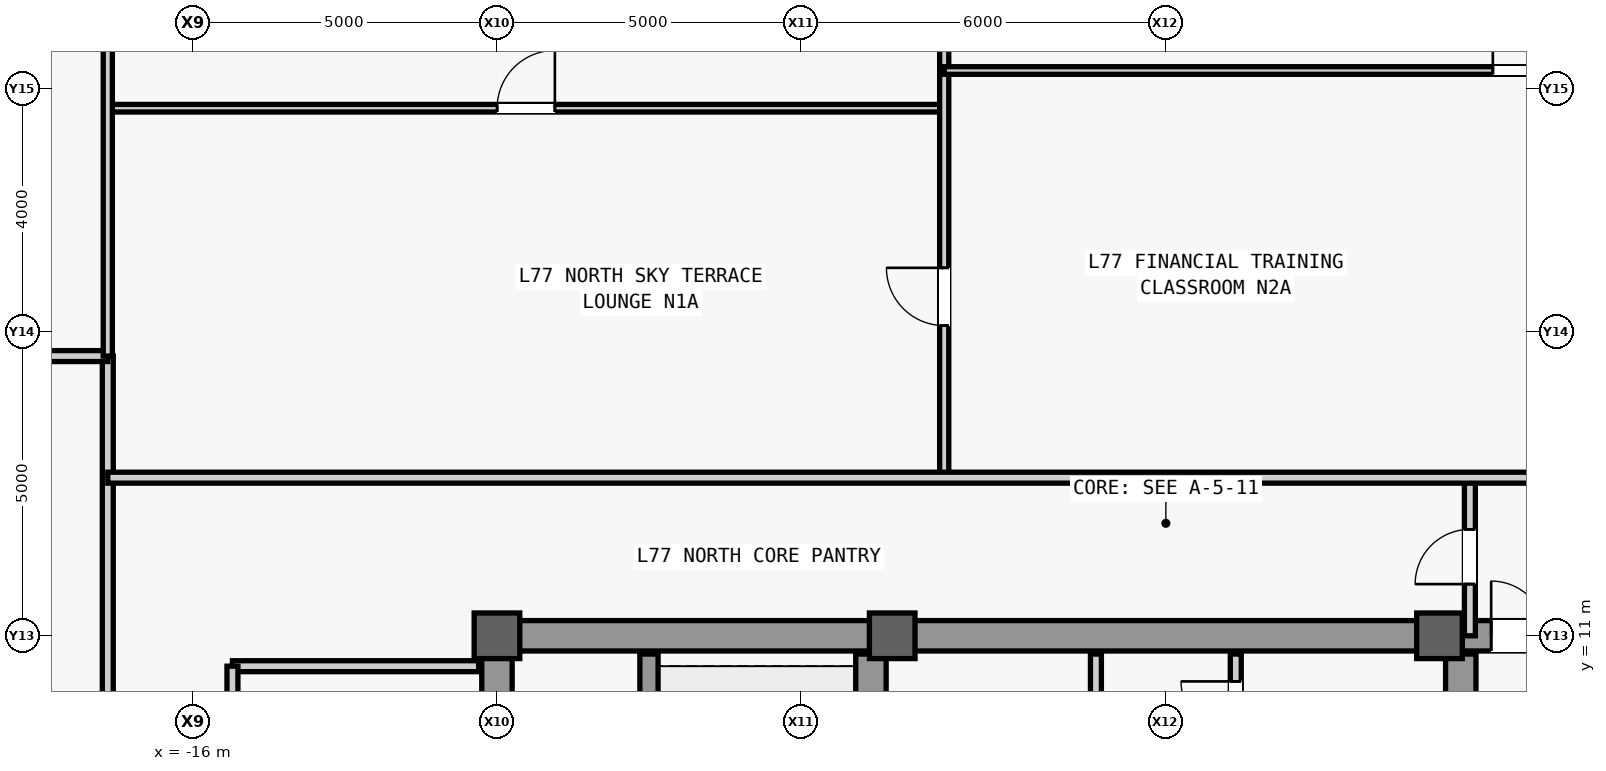
"""IFC4 building model, lengths in metres.
Left out: names, types, materials, properties, quantities, classifications, styles, units other than length and angle.
Written with IfcOpenShell. Run it as: python <this file> out.ifc"""

import sys

from ifc_helpers import new_model, si_unit, direction, frame, frame_2d, origin, origin_2d, place, context, subcontext, project, spatial, rectangle, extrude, source, transform, mapped, element, fill, save


model = new_model("IFC4")
c1 = context("Model", 3, precision=1e-05, world=origin(), true_north=direction((0.0, 1.0)))
c2 = subcontext(c1, "Body", "Model", "MODEL_VIEW")
j1 = project(units=[si_unit("LENGTHUNIT", "METRE"), si_unit("PLANEANGLEUNIT", "RADIAN")], contexts=[c1])
p1 = place(None, origin())
s1 = spatial("IfcSite", under=j1, at=p1, CompositionType="ELEMENT")
p2 = place(p1, origin())
s2 = spatial("IfcBuilding", under=s1, at=p2, CompositionType="ELEMENT")
p3 = place(p2, frame((0.0, 0.0, 326.3)))
s3 = spatial("IfcBuildingStorey", under=s2, at=p3, CompositionType="ELEMENT", Elevation=326.3)
m1 = source(origin(), c2, "Body", "SweptSolid", [
    extrude(rectangle(XDim=22.0, YDim=0.5, at=frame_2d((11.0, 0.0))), origin(), (0.0, 0.0, 1.0), 3.74),
])
p4 = place(p3, frame((-11.0, -11.0, 0.0), z_axis=(0.0, 0.0, 1.0), x_axis=(0.0, 1.0, 0.0)))
e1 = element("IfcWall", 1, at=p4, inside=s3, PredefinedType="SHEAR", context=c2, shape_type="MappedRepresentation", body=[
    mapped(m1, transform((0.0, 0.0, 0.0), scale=1.0)),
])
m2 = source(origin(), c2, "Body", "SweptSolid", [
    extrude(rectangle(XDim=1.1, YDim=2.2, at=frame_2d((0.55, 1.1))), frame((0.0, 0.26, 0.0), z_axis=(0.0, -1.0, 0.0), x_axis=(1.0, 0.0, 0.0)), (0.0, 0.0, 1.0), 0.52),
])
p5 = place(p4, frame((0.8, 0.0, 0.0)))
e2 = element("IfcOpeningElement", 2, at=p5, cuts=e1, PredefinedType="OPENING", context=c2, shape_type="MappedRepresentation", body=[
    mapped(m2, transform((0.0, 0.0, 0.0), scale=1.0)),
])
p6 = place(p4, frame((12.5, 0.0, 0.0)))
e3 = element("IfcOpeningElement", 3, at=p6, cuts=e1, PredefinedType="OPENING", context=c2, shape_type="MappedRepresentation", body=[
    mapped(m2, transform((0.0, 0.0, 0.0), scale=1.0)),
])
m3 = source(origin(), c2, "Body", "SweptSolid", [
    extrude(rectangle(XDim=0.9, YDim=2.15, at=frame_2d((0.45, 1.075))), frame((0.0, 0.26, 0.0), z_axis=(0.0, -1.0, 0.0), x_axis=(1.0, 0.0, 0.0)), (0.0, 0.0, 1.0), 0.52),
])
p7 = place(p4, frame((7.575, 0.0, 0.0)))
e4 = element("IfcOpeningElement", 4, at=p7, cuts=e1, PredefinedType="OPENING", context=c2, shape_type="MappedRepresentation", body=[
    mapped(m3, transform((0.0, 0.0, 0.0), scale=1.0)),
])
m4 = source(origin(), c2, "Body", "SweptSolid", [
    extrude(rectangle(XDim=1.2, YDim=2.3, at=frame_2d((0.6, 1.15))), frame((0.0, 0.26, 0.0), z_axis=(0.0, -1.0, 0.0), x_axis=(1.0, 0.0, 0.0)), (0.0, 0.0, 1.0), 0.52),
])
p8 = place(p4, frame((14.6, 0.0, 0.0)))
e5 = element("IfcOpeningElement", 5, at=p8, cuts=e1, PredefinedType="OPENING", context=c2, shape_type="MappedRepresentation", body=[
    mapped(m4, transform((0.0, 0.0, 0.0), scale=1.0)),
])
p9 = place(p4, frame((18.2, 0.0, 0.0)))
e6 = element("IfcOpeningElement", 6, at=p9, cuts=e1, PredefinedType="OPENING", context=c2, shape_type="MappedRepresentation", body=[
    mapped(m4, transform((0.0, 0.0, 0.0), scale=1.0)),
])
m5 = source(origin(), c2, "Body", "SweptSolid", [
    extrude(rectangle(XDim=1.3, YDim=2.3, at=frame_2d((0.65, 1.15))), frame((0.0, 0.26, 0.0), z_axis=(0.0, -1.0, 0.0), x_axis=(1.0, 0.0, 0.0)), (0.0, 0.0, 1.0), 0.52),
])
p10 = place(p4, frame((2.7, 0.0, 0.0)))
e7 = element("IfcOpeningElement", 7, at=p10, cuts=e1, PredefinedType="OPENING", context=c2, shape_type="MappedRepresentation", body=[
    mapped(m5, transform((0.0, 0.0, 0.0), scale=1.0)),
])
m6 = source(origin(), c2, "Body", "SweptSolid", [
    extrude(rectangle(XDim=21.4, YDim=0.5, at=frame_2d((10.7, 0.0))), origin(), (0.0, 0.0, 1.0), 3.74),
])
for number, where, z_axis, x_axis in (
    (8, (-4.85, -10.7, 0.0), (0.0, 0.0, 1.0), (0.0, 1.0, 0.0)),
    (9, (4.85, -10.7, 0.0), (0.0, 0.0, 1.0), (0.0, 1.0, 0.0)),
):
    element("IfcWall", number, at=place(p3, frame(where, z_axis=z_axis, x_axis=x_axis)), inside=s3, PredefinedType="SHEAR", context=c2, shape_type="MappedRepresentation", body=[
        mapped(m6, transform((0.0, 0.0, 0.0), scale=1.0)),
    ])
m7 = source(origin(), c2, "Body", "SweptSolid", [
    extrude(rectangle(XDim=5.9, YDim=0.5, at=frame_2d((2.95, 0.0))), origin(), (0.0, 0.0, 1.0), 3.74),
])
p11 = place(p3, frame((-10.75, 11.0, 0.0), z_axis=(0.0, 0.0, 1.0), x_axis=(1.0, 0.0, 0.0)))
e10 = element("IfcWall", 10, at=p11, inside=s3, PredefinedType="SHEAR", context=c2, shape_type="MappedRepresentation", body=[
    mapped(m7, transform((0.0, 0.0, 0.0), scale=1.0)),
])
p12 = place(p3, frame((4.85, 11.0, 0.0), z_axis=(0.0, 0.0, 1.0), x_axis=(1.0, 0.0, 0.0)))
e11 = element("IfcWall", 11, at=p12, inside=s3, PredefinedType="SHEAR", context=c2, shape_type="MappedRepresentation", body=[
    mapped(m7, transform((0.0, 0.0, 0.0), scale=1.0)),
])
p13 = place(p12, frame((0.5, 0.0, 0.0)))
e12 = element("IfcOpeningElement", 12, at=p13, cuts=e11, PredefinedType="OPENING", context=c2, shape_type="MappedRepresentation", body=[
    mapped(m3, transform((0.0, 0.0, 0.0), scale=1.0)),
])
m8 = source(origin(), c2, "Body", "SweptSolid", [
    extrude(rectangle(XDim=9.2, YDim=0.5, at=frame_2d((4.6, 0.0))), origin(), (0.0, 0.0, 1.0), 3.74),
])
p14 = place(p3, frame((-4.6, 11.0, 0.0), z_axis=(0.0, 0.0, 1.0), x_axis=(1.0, 0.0, 0.0)))
e13 = element("IfcWall", 13, at=p14, inside=s3, PredefinedType="SHEAR", context=c2, shape_type="MappedRepresentation", body=[
    mapped(m8, transform((0.0, 0.0, 0.0), scale=1.0)),
])
m9 = source(origin(), c2, "Body", "SweptSolid", [
    extrude(rectangle(XDim=0.75, YDim=0.75, at=origin_2d()), origin(), (0.0, 0.0, 1.0), 4.0),
])
for number, where, z_axis, x_axis in (
    (14, (-11.0, 11.0, 0.0), (0.0, 0.0, 1.0), (1.0, 0.0, 0.0)),
    (15, (-4.5, 11.0, 0.0), (0.0, 0.0, 1.0), (1.0, 0.0, 0.0)),
    (16, (4.5, 11.0, 0.0), (0.0, 0.0, 1.0), (1.0, 0.0, 0.0)),
):
    element("IfcColumn", number, at=place(p3, frame(where, z_axis=z_axis, x_axis=x_axis)), inside=s3, PredefinedType="COLUMN", context=c2, shape_type="MappedRepresentation", body=[
        mapped(m9, transform((0.0, 0.0, 0.0), scale=1.0)),
    ])
m10 = source(origin(), c2, "Body", "SweptSolid", [
    extrude(rectangle(XDim=7.75, YDim=0.3, at=frame_2d((3.875, 0.0))), origin(), (0.0, 0.0, 1.0), 3.74),
])
p15 = place(p3, frame((-8.5, 2.95, 0.0), z_axis=(0.0, 0.0, 1.0), x_axis=(0.0, 1.0, 0.0)))
e17 = element("IfcWall", 17, at=p15, inside=s3, PredefinedType="SHEAR", context=c2, shape_type="MappedRepresentation", body=[
    mapped(m10, transform((0.0, 0.0, 0.0), scale=1.0)),
])
m11 = source(origin(), c2, "Body", "SweptSolid", [
    extrude(rectangle(XDim=4.05, YDim=0.18, at=frame_2d((2.025, 0.0))), origin(), (0.0, 0.0, 1.0), 3.74),
])
p16 = place(p3, frame((-15.35, 10.5, 0.0), z_axis=(0.0, 0.0, 1.0), x_axis=(1.0, 0.0, 0.0)))
e18 = element("IfcWall", 18, at=p16, inside=s3, PredefinedType="PARTITIONING", context=c2, shape_type="MappedRepresentation", body=[
    mapped(m11, transform((0.0, 0.0, 0.0), scale=1.0)),
])
m12 = source(origin(), c2, "Body", "SweptSolid", [
    extrude(rectangle(XDim=16.6, YDim=0.18, at=frame_2d((8.3, 0.0))), origin(), (0.0, 0.0, 1.0), 3.74),
])
p17 = place(p3, frame((-15.35, -6.1, 0.0), z_axis=(0.0, 0.0, 1.0), x_axis=(0.0, 1.0, 0.0)))
e19 = element("IfcWall", 19, at=p17, inside=s3, PredefinedType="PARTITIONING", context=c2, shape_type="MappedRepresentation", body=[
    mapped(m12, transform((0.0, 0.0, 0.0), scale=1.0)),
])
m13 = source(origin(), c2, "Body", "SweptSolid", [
    extrude(rectangle(XDim=1.8, YDim=2.25, at=frame_2d((0.9, 1.125))), frame((0.0, 0.1, 0.0), z_axis=(0.0, -1.0, 0.0), x_axis=(1.0, 0.0, 0.0)), (0.0, 0.0, 1.0), 0.2),
])
p18 = place(p17, frame((2.7, 0.0, 0.0)))
e20 = element("IfcOpeningElement", 20, at=p18, cuts=e19, PredefinedType="OPENING", context=c2, shape_type="MappedRepresentation", body=[
    mapped(m13, transform((0.0, 0.0, 0.0), scale=1.0)),
])
p19 = place(p17, frame((11.0, 0.0, 0.0)))
e21 = element("IfcOpeningElement", 21, at=p19, cuts=e19, PredefinedType="OPENING", context=c2, shape_type="MappedRepresentation", body=[
    mapped(m13, transform((0.0, 0.0, 0.0), scale=1.0)),
])
m14 = source(origin(), c2, "Body", "SweptSolid", [
    extrude(rectangle(XDim=5.4, YDim=0.18, at=frame_2d((2.7, 0.0))), origin(), (0.0, 0.0, 1.0), 3.74),
])
p20 = place(p3, frame((-1.15, 5.3, 0.0), z_axis=(0.0, 0.0, 1.0), x_axis=(0.0, 1.0, 0.0)))
e22 = element("IfcWall", 22, at=p20, inside=s3, PredefinedType="PARTITIONING", context=c2, shape_type="MappedRepresentation", body=[
    mapped(m14, transform((0.0, 0.0, 0.0), scale=1.0)),
])
m15 = source(origin(), c2, "Body", "SweptSolid", [
    extrude(rectangle(XDim=0.9, YDim=2.15, at=frame_2d((0.45, 1.075))), frame((0.0, 0.1, 0.0), z_axis=(0.0, -1.0, 0.0), x_axis=(1.0, 0.0, 0.0)), (0.0, 0.0, 1.0), 0.2),
])
p21 = place(p20, frame((0.7, 0.0, 0.0)))
e23 = element("IfcOpeningElement", 23, at=p21, cuts=e22, PredefinedType="OPENING", context=c2, shape_type="MappedRepresentation", body=[
    mapped(m15, transform((0.0, 0.0, 0.0), scale=1.0)),
])
p22 = place(p20, frame((3.4, 0.0, 0.0)))
e24 = element("IfcOpeningElement", 24, at=p22, cuts=e22, PredefinedType="OPENING", context=c2, shape_type="MappedRepresentation", body=[
    mapped(m15, transform((0.0, 0.0, 0.0), scale=1.0)),
])
p23 = place(p3, frame((1.15, 5.3, 0.0), z_axis=(0.0, 0.0, 1.0), x_axis=(0.0, 1.0, 0.0)))
e25 = element("IfcWall", 25, at=p23, inside=s3, PredefinedType="PARTITIONING", context=c2, shape_type="MappedRepresentation", body=[
    mapped(m14, transform((0.0, 0.0, 0.0), scale=1.0)),
])
p24 = place(p23, frame((0.45, 0.0, 0.0)))
e26 = element("IfcOpeningElement", 26, at=p24, cuts=e25, PredefinedType="OPENING", context=c2, shape_type="MappedRepresentation", body=[
    mapped(m15, transform((0.0, 0.0, 0.0), scale=1.0)),
])
p25 = place(p23, frame((2.25, 0.0, 0.0)))
e27 = element("IfcOpeningElement", 27, at=p25, cuts=e25, PredefinedType="OPENING", context=c2, shape_type="MappedRepresentation", body=[
    mapped(m15, transform((0.0, 0.0, 0.0), scale=1.0)),
])
p26 = place(p23, frame((4.05, 0.0, 0.0)))
e28 = element("IfcOpeningElement", 28, at=p26, cuts=e25, PredefinedType="OPENING", context=c2, shape_type="MappedRepresentation", body=[
    mapped(m15, transform((0.0, 0.0, 0.0), scale=1.0)),
])
m16 = source(origin(), c2, "Body", "SweptSolid", [
    extrude(rectangle(XDim=8.4, YDim=0.18, at=frame_2d((4.2, 0.0))), origin(), (0.0, 0.0, 1.0), 3.74),
])
p27 = place(p3, frame((-17.4, 7.2, 0.0), z_axis=(0.0, 0.0, 1.0), x_axis=(0.0, 1.0, 0.0)))
e29 = element("IfcWall", 29, at=p27, inside=s3, PredefinedType="PARTITIONING", context=c2, shape_type="MappedRepresentation", body=[
    mapped(m16, transform((0.0, 0.0, 0.0), scale=1.0)),
])
m17 = source(origin(), c2, "Body", "SweptSolid", [
    extrude(rectangle(XDim=2.6, YDim=0.18, at=frame_2d((1.3, 0.0))), origin(), (0.0, 0.0, 1.0), 3.74),
])
p28 = place(p3, frame((5.0, 11.0, 0.0), z_axis=(0.0, 0.0, 1.0), x_axis=(0.0, 1.0, 0.0)))
e30 = element("IfcWall", 30, at=p28, inside=s3, PredefinedType="PARTITIONING", context=c2, shape_type="MappedRepresentation", body=[
    mapped(m17, transform((0.0, 0.0, 0.0), scale=1.0)),
])
p29 = place(p28, frame((0.85, 0.0, 0.0)))
e31 = element("IfcOpeningElement", 31, at=p29, cuts=e30, PredefinedType="OPENING", context=c2, shape_type="MappedRepresentation", body=[
    mapped(m15, transform((0.0, 0.0, 0.0), scale=1.0)),
])
m18 = source(origin(), c2, "Body", "SweptSolid", [
    extrude(rectangle(XDim=1.15, YDim=0.18, at=frame_2d((0.575, 0.0))), origin(), (0.0, 0.0, 1.0), 3.74),
])
p30 = place(p3, frame((-18.55, 15.6, 0.0), z_axis=(0.0, 0.0, 1.0), x_axis=(1.0, 0.0, 0.0)))
e32 = element("IfcWall", 32, at=p30, inside=s3, PredefinedType="PARTITIONING", context=c2, shape_type="MappedRepresentation", body=[
    mapped(m18, transform((0.0, 0.0, 0.0), scale=1.0)),
])
m19 = source(origin(), c2, "Body", "SweptSolid", [
    extrude(rectangle(XDim=13.755, YDim=0.125, at=frame_2d((6.877, 0.0))), origin(), (0.0, 0.0, 1.0), 3.393),
])
p31 = place(p3, frame((-17.4, 19.676, 0.0), z_axis=(0.0, 0.0, 1.0), x_axis=(1.0, 0.0, 0.0)))
e33 = element("IfcWall", 33, at=p31, inside=s3, PredefinedType="PARTITIONING", context=c2, shape_type="MappedRepresentation", body=[
    mapped(m19, transform((0.0, 0.0, 0.0), scale=1.0)),
])
m20 = source(origin(), c2, "Body", "SweptSolid", [
    extrude(rectangle(XDim=0.95, YDim=2.15, at=frame_2d((0.475, 1.075))), frame((0.0, 0.073, 0.0), z_axis=(0.0, -1.0, 0.0), x_axis=(1.0, 0.0, 0.0)), (0.0, 0.0, 1.0), 0.145),
])
p32 = place(p31, frame((6.403, 0.0, 0.0)))
e34 = element("IfcOpeningElement", 34, at=p32, cuts=e33, PredefinedType="OPENING", context=c2, shape_type="MappedRepresentation", body=[
    mapped(m20, transform((0.0, 0.0, 0.0), scale=1.0)),
])
m21 = source(origin(), c2, "Body", "SweptSolid", [
    extrude(rectangle(XDim=12.4, YDim=0.15, at=frame_2d((6.2, 0.0))), origin(), (0.0, 0.0, 1.0), 3.74),
])
p33 = place(p3, frame((-3.645, 13.6, 0.0), z_axis=(0.0, 0.0, 1.0), x_axis=(0.0, 1.0, 0.0)))
e35 = element("IfcWall", 35, at=p33, inside=s3, PredefinedType="PARTITIONING", context=c2, shape_type="MappedRepresentation", body=[
    mapped(m21, transform((0.0, 0.0, 0.0), scale=1.0)),
])
m22 = source(origin(), c2, "Body", "SweptSolid", [
    extrude(rectangle(XDim=0.95, YDim=2.15, at=frame_2d((0.475, 1.075))), frame((0.0, 0.085, 0.0), z_axis=(0.0, -1.0, 0.0), x_axis=(1.0, 0.0, 0.0)), (0.0, 0.0, 1.0), 0.17),
])
p34 = place(p33, frame((2.501, 0.0, 0.0)))
e36 = element("IfcOpeningElement", 36, at=p34, cuts=e35, PredefinedType="OPENING", context=c2, shape_type="MappedRepresentation", body=[
    mapped(m22, transform((0.0, 0.0, 0.0), scale=1.0)),
])
m23 = source(origin(), c2, "Body", "SweptSolid", [
    extrude(rectangle(XDim=18.995, YDim=0.125, at=frame_2d((9.498, 0.0))), origin(), (0.0, 0.0, 1.0), 3.74),
])
p35 = place(p3, frame((-3.645, 20.296, 0.0), z_axis=(0.0, 0.0, 1.0), x_axis=(1.0, 0.0, 0.0)))
e37 = element("IfcWall", 37, at=p35, inside=s3, PredefinedType="PARTITIONING", context=c2, shape_type="MappedRepresentation", body=[
    mapped(m23, transform((0.0, 0.0, 0.0), scale=1.0)),
])
p36 = place(p35, frame((9.022, 0.0, 0.0)))
e38 = element("IfcOpeningElement", 38, at=p36, cuts=e37, PredefinedType="OPENING", context=c2, shape_type="MappedRepresentation", body=[
    mapped(m20, transform((0.0, 0.0, 0.0), scale=1.0)),
])
m24 = source(origin(), c2, "Body", "SweptSolid", [
    extrude(rectangle(XDim=32.75, YDim=0.18, at=frame_2d((16.375, 0.0))), origin(), (0.0, 0.0, 1.0), 3.74),
])
p37 = place(p3, frame((-17.4, 13.6, 0.0), z_axis=(0.0, 0.0, 1.0), x_axis=(1.0, 0.0, 0.0)))
e39 = element("IfcWall", 39, at=p37, inside=s3, PredefinedType="PARTITIONING", context=c2, shape_type="MappedRepresentation", body=[
    mapped(m24, transform((0.0, 0.0, 0.0), scale=1.0)),
])
m25 = source(origin(), c2, "Body", "SweptSolid", [
    extrude(rectangle(XDim=1.05, YDim=2.2, at=frame_2d((0.525, 1.1))), frame((0.0, 0.1, 0.0), z_axis=(0.0, -1.0, 0.0), x_axis=(1.0, 0.0, 0.0)), (0.0, 0.0, 1.0), 0.2),
])
p38 = place(p37, frame((27.075, 0.0, 0.0)))
e40 = element("IfcOpeningElement", 40, at=p38, cuts=e39, PredefinedType="OPENING", context=c2, shape_type="MappedRepresentation", body=[
    mapped(m25, transform((0.0, 0.0, 0.0), scale=1.0)),
])
m26 = source(origin(), c2, "Body", "SweptSolid", [
    extrude(rectangle(XDim=10.4, YDim=0.15, at=frame_2d((5.2, 0.0))), origin(), (0.0, 0.0, 1.0), 3.74),
])
p39 = place(p3, frame((-17.4, 15.6, 0.0), z_axis=(0.0, 0.0, 1.0), x_axis=(0.0, 1.0, 0.0)))
e41 = element("IfcWall", 41, at=p39, inside=s3, PredefinedType="PARTITIONING", context=c2, shape_type="MappedRepresentation", body=[
    mapped(m26, transform((0.0, 0.0, 0.0), scale=1.0)),
])
m27 = source(origin(), c2, "Body", "SweptSolid", [
    extrude(rectangle(XDim=0.9, YDim=2.15, at=frame_2d((0.45, 1.075))), frame((0.0, 0.025, 0.0), z_axis=(0.0, -1.0, 0.0), x_axis=(1.0, 0.0, 0.0)), (0.0, 0.0, 1.0), 0.05),
])
p40 = place(p13, origin())
e42 = element("IfcDoor", 42, at=p40, inside=s3, OperationType="SINGLE_SWING_LEFT", PredefinedType="DOOR", context=c2, shape_type="MappedRepresentation", body=[
    mapped(m27, transform((0.0, 0.0, 0.0), scale=1.0)),
])
fill(e12, e42)
p41 = place(p26, origin())
e43 = element("IfcDoor", 43, at=p41, inside=s3, OperationType="SINGLE_SWING_RIGHT", PredefinedType="DOOR", context=c2, shape_type="MappedRepresentation", body=[
    mapped(m27, transform((0.0, 0.0, 0.0), scale=1.0)),
])
fill(e28, e43)
p42 = place(p29, origin())
e44 = element("IfcDoor", 44, at=p42, inside=s3, OperationType="SINGLE_SWING_LEFT", PredefinedType="DOOR", context=c2, shape_type="MappedRepresentation", body=[
    mapped(m27, transform((0.0, 0.0, 0.0), scale=1.0)),
])
fill(e31, e44)
m28 = source(origin(), c2, "Body", "SweptSolid", [
    extrude(rectangle(XDim=0.95, YDim=2.15, at=frame_2d((0.475, 1.075))), frame((0.0, 0.025, 0.0), z_axis=(0.0, -1.0, 0.0), x_axis=(1.0, 0.0, 0.0)), (0.0, 0.0, 1.0), 0.05),
])
p43 = place(p32, origin())
e45 = element("IfcDoor", 45, at=p43, inside=s3, OperationType="SINGLE_SWING_RIGHT", PredefinedType="DOOR", context=c2, shape_type="MappedRepresentation", body=[
    mapped(m28, transform((0.0, 0.0, 0.0), scale=1.0)),
])
fill(e34, e45)
p44 = place(p34, origin())
e46 = element("IfcDoor", 46, at=p44, inside=s3, OperationType="SINGLE_SWING_RIGHT", PredefinedType="DOOR", context=c2, shape_type="MappedRepresentation", body=[
    mapped(m28, transform((0.0, 0.0, 0.0), scale=1.0)),
])
fill(e36, e46)
p45 = place(p36, origin())
e47 = element("IfcDoor", 47, at=p45, inside=s3, OperationType="SINGLE_SWING_LEFT", PredefinedType="DOOR", context=c2, shape_type="MappedRepresentation", body=[
    mapped(m28, transform((0.0, 0.0, 0.0), scale=1.0)),
])
fill(e38, e47)
save(model, sys.argv[1])
